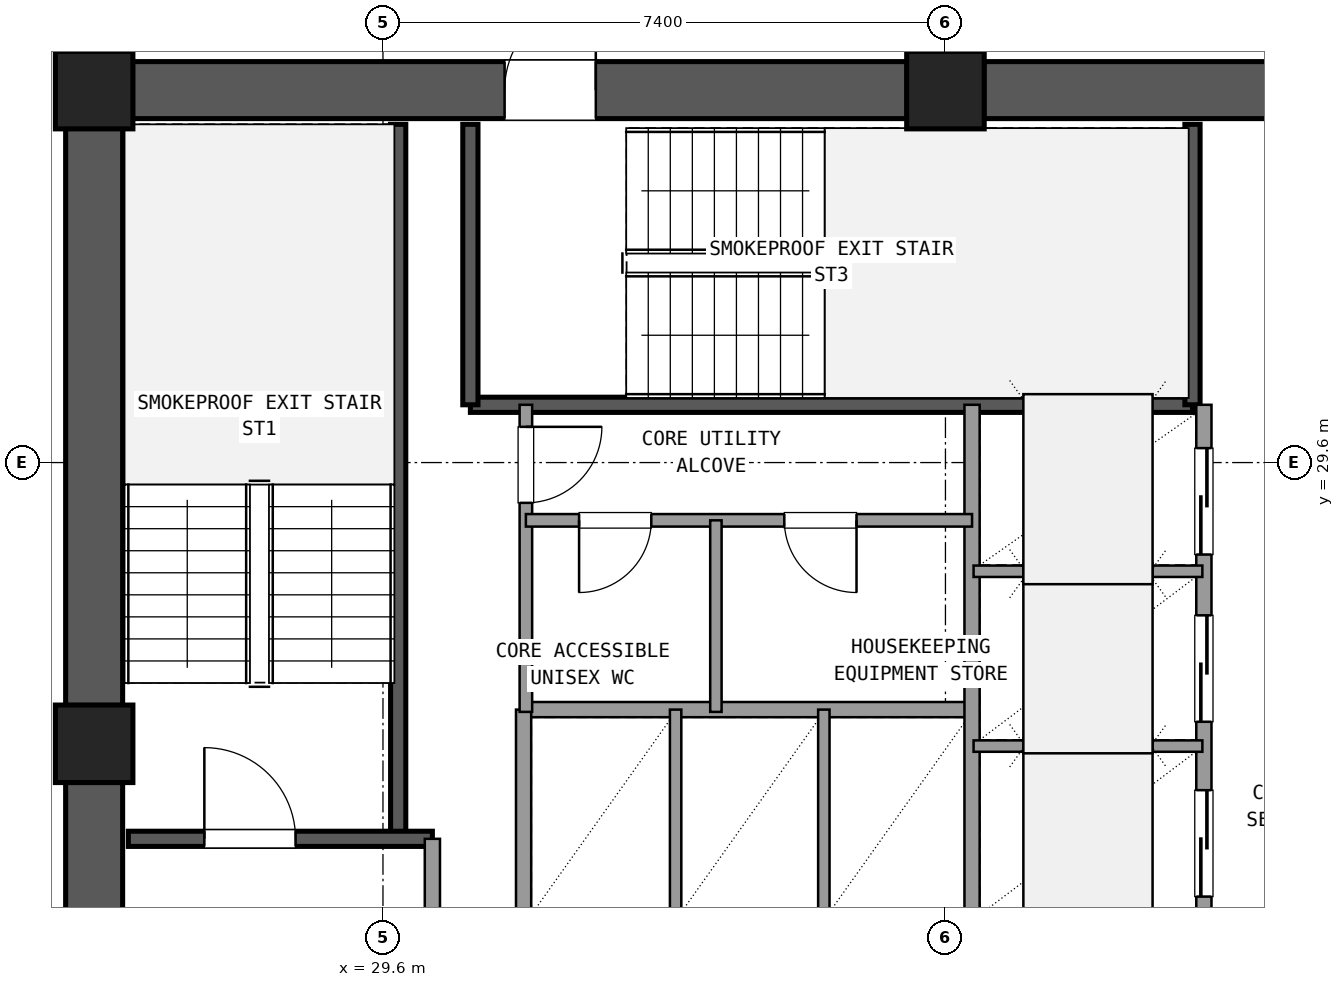
"""IFC4 building model, lengths in metres.
Left out: names, types, materials, properties, quantities, classifications, styles, units other than length and angle.
Written with IfcOpenShell. Run it as: python <this file> out.ifc"""

import sys

from ifc_helpers import new_model, si_unit, direction, frame, frame_2d, origin, origin_2d, place, context, subcontext, project, spatial, rectangle, extrude, element, fill, save


model = new_model("IFC4")
c1 = context("Model", 3, precision=1e-05, world=origin(), true_north=direction((0.0, 1.0)))
c2 = subcontext(c1, "Body", "Model", "MODEL_VIEW")
j1 = project(units=[si_unit("LENGTHUNIT", "METRE"), si_unit("PLANEANGLEUNIT", "RADIAN")], contexts=[c1])
p1 = place(None, origin())
s1 = spatial("IfcSite", under=j1, at=p1, CompositionType="ELEMENT")
p2 = place(p1, origin())
s2 = spatial("IfcBuilding", under=s1, at=p2, CompositionType="ELEMENT")
p3 = place(p2, frame((0.0, 0.0, 95.58)))
s3 = spatial("IfcBuildingStorey", under=s2, at=p3, CompositionType="ELEMENT", Elevation=95.58)
for number, where, z_axis, x_axis in (
    (1, (37.0, 34.5, 0.0), (0.0, 0.0, 1.0), (1.0, 0.0, 0.0)),
    (2, (25.8, 34.5, 0.0), (0.0, 0.0, 1.0), (1.0, 0.0, 0.0)),
    (3, (25.8, 25.9, 0.0), (0.0, 0.0, 1.0), (1.0, 0.0, 0.0)),
):
    element("IfcColumn", number, at=place(p3, frame(where, z_axis=z_axis, x_axis=x_axis)), inside=s3, PredefinedType="COLUMN", context=c2, shape_type="SweptSolid", body=[
        extrude(rectangle(XDim=1.02, YDim=1.02, at=origin_2d()), origin(), (0.0, 0.0, 1.0), 3.6),
    ])
p4 = place(p3, frame((47.695, 34.5, 0.0), z_axis=(0.0, 0.0, 1.0), x_axis=(-1.0, 0.0, 0.0)))
e4 = element("IfcWall", 4, at=p4, inside=s3, PredefinedType="SHEAR", context=c2, shape_type="SweptSolid", body=[
    extrude(rectangle(XDim=10.19, YDim=0.75, at=frame_2d((5.095, 0.0))), origin(), (0.0, 0.0, 1.0), 3.32),
])
p5 = place(p4, frame((4.595, 0.0, 0.0)))
e5 = element("IfcOpeningElement", 5, at=p5, cuts=e4, PredefinedType="OPENING", context=c2, shape_type="SweptSolid", body=[
    extrude(rectangle(XDim=1.6, YDim=2.2, at=frame_2d((0.8, 1.1))), frame((0.0, 0.385, 0.0), z_axis=(0.0, -1.0, 0.0), x_axis=(1.0, 0.0, 0.0)), (0.0, 0.0, 1.0), 0.77),
])
p6 = place(p3, frame((36.495, 34.5, 0.0), z_axis=(0.0, 0.0, 1.0), x_axis=(-1.0, 0.0, 0.0)))
e6 = element("IfcWall", 6, at=p6, inside=s3, PredefinedType="SHEAR", context=c2, shape_type="SweptSolid", body=[
    extrude(rectangle(XDim=10.19, YDim=0.75, at=frame_2d((5.095, 0.0))), origin(), (0.0, 0.0, 1.0), 3.32),
])
p7 = place(p6, frame((4.095, 0.0, 0.0)))
e7 = element("IfcOpeningElement", 7, at=p7, cuts=e6, PredefinedType="OPENING", context=c2, shape_type="SweptSolid", body=[
    extrude(rectangle(XDim=1.2, YDim=2.15, at=frame_2d((0.6, 1.075))), frame((0.0, 0.385, 0.0), z_axis=(0.0, -1.0, 0.0), x_axis=(1.0, 0.0, 0.0)), (0.0, 0.0, 1.0), 0.77),
])
p8 = place(p3, frame((25.8, 33.995, 0.0), z_axis=(0.0, 0.0, 1.0), x_axis=(0.0, -1.0, 0.0)))
e8 = element("IfcWall", 8, at=p8, inside=s3, PredefinedType="SHEAR", context=c2, shape_type="SweptSolid", body=[
    extrude(rectangle(XDim=7.59, YDim=0.75, at=frame_2d((3.795, 0.0))), origin(), (0.0, 0.0, 1.0), 3.32),
])
p9 = place(p3, frame((25.8, 25.395, 0.0), z_axis=(0.0, 0.0, 1.0), x_axis=(0.0, -1.0, 0.0)))
e9 = element("IfcWall", 9, at=p9, inside=s3, PredefinedType="SHEAR", context=c2, shape_type="SweptSolid", body=[
    extrude(rectangle(XDim=7.59, YDim=0.75, at=frame_2d((3.795, 0.0))), origin(), (0.0, 0.0, 1.0), 3.32),
])
p10 = place(p9, frame((2.145, 0.0, 0.0)))
e10 = element("IfcOpeningElement", 10, at=p10, cuts=e9, PredefinedType="OPENING", context=c2, shape_type="SweptSolid", body=[
    extrude(rectangle(XDim=1.2, YDim=2.15, at=frame_2d((0.6, 1.075))), frame((0.0, 0.385, 0.0), z_axis=(0.0, -1.0, 0.0), x_axis=(1.0, 0.0, 0.0)), (0.0, 0.0, 1.0), 0.77),
])
p11 = place(p3, frame((29.8, 24.65, 0.0), z_axis=(0.0, 0.0, 1.0), x_axis=(0.0, 1.0, 0.0)))
e11 = element("IfcWall", 11, at=p11, inside=s3, PredefinedType="SHEAR", context=c2, shape_type="SweptSolid", body=[
    extrude(rectangle(XDim=9.4, YDim=0.2, at=frame_2d((4.7, 0.0))), origin(), (0.0, 0.0, 1.0), 3.32),
])
p12 = place(p3, frame((26.25, 24.65, 0.0), z_axis=(0.0, 0.0, 1.0), x_axis=(1.0, 0.0, 0.0)))
e12 = element("IfcWall", 12, at=p12, inside=s3, PredefinedType="SHEAR", context=c2, shape_type="SweptSolid", body=[
    extrude(rectangle(XDim=4.0, YDim=0.2, at=frame_2d((2.0, 0.0))), origin(), (0.0, 0.0, 1.0), 3.32),
])
p13 = place(p12, frame((1.0, 0.0, 0.0)))
e13 = element("IfcOpeningElement", 13, at=p13, cuts=e12, PredefinedType="OPENING", context=c2, shape_type="SweptSolid", body=[
    extrude(rectangle(XDim=1.2, YDim=2.15, at=frame_2d((0.6, 1.075))), frame((0.0, 0.11, 0.0), z_axis=(0.0, -1.0, 0.0), x_axis=(1.0, 0.0, 0.0)), (0.0, 0.0, 1.0), 0.22),
])
p14 = place(p3, frame((30.75, 30.36, 0.0), z_axis=(0.0, 0.0, 1.0), x_axis=(1.0, 0.0, 0.0)))
e14 = element("IfcWall", 14, at=p14, inside=s3, PredefinedType="SHEAR", context=c2, shape_type="SweptSolid", body=[
    extrude(rectangle(XDim=9.5, YDim=0.2, at=frame_2d((4.75, 0.0))), origin(), (0.0, 0.0, 1.0), 3.32),
])
for number, where, z_axis, x_axis in (
    (15, (30.75, 30.36, 0.0), (0.0, 0.0, 1.0), (0.0, 1.0, 0.0)),
    (16, (40.25, 30.36, 0.0), (0.0, 0.0, 1.0), (0.0, 1.0, 0.0)),
):
    element("IfcWall", number, at=place(p3, frame(where, z_axis=z_axis, x_axis=x_axis)), inside=s3, PredefinedType="SHEAR", context=c2, shape_type="SweptSolid", body=[
        extrude(rectangle(XDim=3.69, YDim=0.2, at=frame_2d((1.845, 0.0))), origin(), (0.0, 0.0, 1.0), 3.32),
    ])
p15 = place(p3, frame((30.25, 17.75, 0.0), z_axis=(0.0, 0.0, 1.0), x_axis=(0.0, 1.0, 0.0)))
e17 = element("IfcWall", 17, at=p15, inside=s3, PredefinedType="SOLIDWALL", context=c2, shape_type="SweptSolid", body=[
    extrude(rectangle(XDim=6.9, YDim=0.2, at=frame_2d((3.45, 0.0))), origin(), (0.0, 0.0, 1.0), 2.61),
])
p16 = place(p15, frame((4.15, 0.0, 0.0)))
e18 = element("IfcOpeningElement", 18, at=p16, cuts=e17, PredefinedType="OPENING", context=c2, shape_type="SweptSolid", body=[
    extrude(rectangle(XDim=1.2, YDim=2.15, at=frame_2d((0.6, 1.075))), frame((0.0, 0.11, 0.0), z_axis=(0.0, -1.0, 0.0), x_axis=(1.0, 0.0, 0.0)), (0.0, 0.0, 1.0), 0.22),
])
p17 = place(p3, frame((31.45, 26.35, 0.0), z_axis=(0.0, 0.0, 1.0), x_axis=(1.0, 0.0, 0.0)))
e19 = element("IfcWall", 19, at=p17, inside=s3, PredefinedType="SOLIDWALL", context=c2, shape_type="SweptSolid", body=[
    extrude(rectangle(XDim=5.9, YDim=0.2, at=frame_2d((2.95, 0.0))), origin(), (0.0, 0.0, 1.0), 2.61),
])
p18 = place(p3, frame((31.45, 23.54, 0.0), z_axis=(0.0, 0.0, 1.0), x_axis=(0.0, 1.0, 0.0)))
e20 = element("IfcWall", 20, at=p18, inside=s3, PredefinedType="SOLIDWALL", context=c2, shape_type="SweptSolid", body=[
    extrude(rectangle(XDim=2.81, YDim=0.2, at=frame_2d((1.405, 0.0))), origin(), (0.0, 0.0, 1.0), 2.61),
])
for number, where, z_axis, x_axis in (
    (21, (33.45, 23.54, 0.0), (0.0, 0.0, 1.0), (0.0, 1.0, 0.0)),
    (22, (35.4, 23.54, 0.0), (0.0, 0.0, 1.0), (0.0, 1.0, 0.0)),
):
    element("IfcWall", number, at=place(p3, frame(where, z_axis=z_axis, x_axis=x_axis)), inside=s3, PredefinedType="PARTITIONING", context=c2, shape_type="SweptSolid", body=[
        extrude(rectangle(XDim=2.81, YDim=0.15, at=frame_2d((1.405, 0.0))), origin(), (0.0, 0.0, 1.0), 2.61),
    ])
p19 = place(p3, frame((37.35, 23.54, 0.0), z_axis=(0.0, 0.0, 1.0), x_axis=(0.0, 1.0, 0.0)))
e23 = element("IfcWall", 23, at=p19, inside=s3, PredefinedType="SOLIDWALL", context=c2, shape_type="SweptSolid", body=[
    extrude(rectangle(XDim=6.82, YDim=0.2, at=frame_2d((3.41, 0.0))), origin(), (0.0, 0.0, 1.0), 2.61),
])
p20 = place(p3, frame((40.4, 23.54, 0.0), z_axis=(0.0, 0.0, 1.0), x_axis=(0.0, 1.0, 0.0)))
e24 = element("IfcWall", 24, at=p20, inside=s3, PredefinedType="SOLIDWALL", context=c2, shape_type="SweptSolid", body=[
    extrude(rectangle(XDim=6.82, YDim=0.2, at=frame_2d((3.41, 0.0))), origin(), (0.0, 0.0, 1.0), 2.61),
])
p21 = place(p20, frame((0.35, 0.0, 0.0)))
e25 = element("IfcOpeningElement", 25, at=p21, cuts=e24, PredefinedType="OPENING", context=c2, shape_type="SweptSolid", body=[
    extrude(rectangle(XDim=1.4, YDim=2.2, at=frame_2d((0.7, 1.1))), frame((0.0, 0.11, 0.0), z_axis=(0.0, -1.0, 0.0), x_axis=(1.0, 0.0, 0.0)), (0.0, 0.0, 1.0), 0.22),
])
p22 = place(p20, frame((2.65, 0.0, 0.0)))
e26 = element("IfcOpeningElement", 26, at=p22, cuts=e24, PredefinedType="OPENING", context=c2, shape_type="SweptSolid", body=[
    extrude(rectangle(XDim=1.4, YDim=2.2, at=frame_2d((0.7, 1.1))), frame((0.0, 0.11, 0.0), z_axis=(0.0, -1.0, 0.0), x_axis=(1.0, 0.0, 0.0)), (0.0, 0.0, 1.0), 0.22),
])
p23 = place(p20, frame((4.85, 0.0, 0.0)))
e27 = element("IfcOpeningElement", 27, at=p23, cuts=e24, PredefinedType="OPENING", context=c2, shape_type="SweptSolid", body=[
    extrude(rectangle(XDim=1.4, YDim=2.2, at=frame_2d((0.7, 1.1))), frame((0.0, 0.11, 0.0), z_axis=(0.0, -1.0, 0.0), x_axis=(1.0, 0.0, 0.0)), (0.0, 0.0, 1.0), 0.22),
])
for number, where, z_axis, x_axis in (
    (28, (37.37, 25.87, 0.0), (0.0, 0.0, 1.0), (1.0, 0.0, 0.0)),
    (29, (37.37, 28.17, 0.0), (0.0, 0.0, 1.0), (1.0, 0.0, 0.0)),
):
    element("IfcWall", number, at=place(p3, frame(where, z_axis=z_axis, x_axis=x_axis)), inside=s3, PredefinedType="PARTITIONING", context=c2, shape_type="SweptSolid", body=[
        extrude(rectangle(XDim=3.01, YDim=0.15, at=frame_2d((1.505, 0.0))), origin(), (0.0, 0.0, 1.0), 2.61),
    ])
p24 = place(p3, frame((31.48, 26.32, 0.0), z_axis=(0.0, 0.0, 1.0), x_axis=(0.0, 1.0, 0.0)))
e30 = element("IfcWall", 30, at=p24, inside=s3, PredefinedType="PLUMBINGWALL", context=c2, shape_type="SweptSolid", body=[
    extrude(rectangle(XDim=4.04, YDim=0.165, at=frame_2d((2.02, 0.0))), origin(), (0.0, 0.0, 1.0), 2.61),
])
p25 = place(p24, frame((2.75, 0.0, 0.0)))
e31 = element("IfcOpeningElement", 31, at=p25, cuts=e30, PredefinedType="OPENING", context=c2, shape_type="SweptSolid", body=[
    extrude(rectangle(XDim=1.0, YDim=2.15, at=frame_2d((0.5, 1.075))), frame((0.0, 0.093, 0.0), z_axis=(0.0, -1.0, 0.0), x_axis=(1.0, 0.0, 0.0)), (0.0, 0.0, 1.0), 0.185),
])
p26 = place(p3, frame((31.48, 28.84, 0.0), z_axis=(0.0, 0.0, 1.0), x_axis=(1.0, 0.0, 0.0)))
e32 = element("IfcWall", 32, at=p26, inside=s3, PredefinedType="PLUMBINGWALL", context=c2, shape_type="SweptSolid", body=[
    extrude(rectangle(XDim=5.87, YDim=0.165, at=frame_2d((2.935, 0.0))), origin(), (0.0, 0.0, 1.0), 2.61),
])
p27 = place(p26, frame((0.7, 0.0, 0.0)))
e33 = element("IfcOpeningElement", 33, at=p27, cuts=e32, PredefinedType="OPENING", context=c2, shape_type="SweptSolid", body=[
    extrude(rectangle(XDim=0.95, YDim=2.1, at=frame_2d((0.475, 1.05))), frame((0.0, 0.093, 0.0), z_axis=(0.0, -1.0, 0.0), x_axis=(1.0, 0.0, 0.0)), (0.0, 0.0, 1.0), 0.185),
])
p28 = place(p26, frame((3.4, 0.0, 0.0)))
e34 = element("IfcOpeningElement", 34, at=p28, cuts=e32, PredefinedType="OPENING", context=c2, shape_type="SweptSolid", body=[
    extrude(rectangle(XDim=0.95, YDim=2.1, at=frame_2d((0.475, 1.05))), frame((0.0, 0.093, 0.0), z_axis=(0.0, -1.0, 0.0), x_axis=(1.0, 0.0, 0.0)), (0.0, 0.0, 1.0), 0.185),
])
p29 = place(p3, frame((33.98, 26.32, 0.0), z_axis=(0.0, 0.0, 1.0), x_axis=(0.0, 1.0, 0.0)))
e35 = element("IfcWall", 35, at=p29, inside=s3, PredefinedType="PARTITIONING", context=c2, shape_type="SweptSolid", body=[
    extrude(rectangle(XDim=2.52, YDim=0.15, at=frame_2d((1.26, 0.0))), origin(), (0.0, 0.0, 1.0), 2.61),
])
p30 = place(p3, frame((37.0, 34.95, 0.0), z_axis=(0.0, 0.0, 1.0), x_axis=(0.0, 1.0, 0.0)))
e36 = element("IfcWall", 36, at=p30, inside=s3, PredefinedType="PARTITIONING", context=c2, shape_type="SweptSolid", body=[
    extrude(rectangle(XDim=3.21, YDim=0.18, at=frame_2d((1.605, 0.0))), origin(), (0.0, 0.0, 1.0), 2.61),
])
p31 = place(p30, frame((0.605, 0.0, 0.0)))
e37 = element("IfcOpeningElement", 37, at=p31, cuts=e36, PredefinedType="OPENING", context=c2, shape_type="SweptSolid", body=[
    extrude(rectangle(XDim=2.0, YDim=2.2, at=frame_2d((1.0, 1.1))), frame((0.0, 0.1, 0.0), z_axis=(0.0, -1.0, 0.0), x_axis=(1.0, 0.0, 0.0)), (0.0, 0.0, 1.0), 0.2),
])
p32 = place(p13, origin())
e38 = element("IfcDoor", 38, at=p32, inside=s3, OperationType="SINGLE_SWING_LEFT", PredefinedType="DOOR", context=c2, shape_type="SweptSolid", body=[
    extrude(rectangle(XDim=1.2, YDim=2.15, at=frame_2d((0.6, 1.075))), frame((0.0, 0.025, 0.0), z_axis=(0.0, -1.0, 0.0), x_axis=(1.0, 0.0, 0.0)), (0.0, 0.0, 1.0), 0.05),
])
fill(e13, e38)
p33 = place(p7, frame((1.2, 0.0, 0.0), z_axis=(0.0, 0.0, 1.0), x_axis=(-1.0, 0.0, 0.0)))
e39 = element("IfcDoor", 39, at=p33, inside=s3, OperationType="SINGLE_SWING_LEFT", PredefinedType="DOOR", context=c2, shape_type="SweptSolid", body=[
    extrude(rectangle(XDim=1.2, YDim=2.15, at=frame_2d((0.6, 1.075))), frame((0.0, 0.025, 0.0), z_axis=(0.0, -1.0, 0.0), x_axis=(1.0, 0.0, 0.0)), (0.0, 0.0, 1.0), 0.05),
])
fill(e7, e39)
p34 = place(p21, origin())
e40 = element("IfcDoor", 40, at=p34, inside=s3, OperationType="SLIDING_TO_LEFT", PredefinedType="DOOR", context=c2, shape_type="SweptSolid", body=[
    extrude(rectangle(XDim=1.4, YDim=2.2, at=frame_2d((0.7, 1.1))), frame((0.0, 0.025, 0.0), z_axis=(0.0, -1.0, 0.0), x_axis=(1.0, 0.0, 0.0)), (0.0, 0.0, 1.0), 0.05),
])
fill(e25, e40)
p35 = place(p22, origin())
e41 = element("IfcDoor", 41, at=p35, inside=s3, OperationType="SLIDING_TO_LEFT", PredefinedType="DOOR", context=c2, shape_type="SweptSolid", body=[
    extrude(rectangle(XDim=1.4, YDim=2.2, at=frame_2d((0.7, 1.1))), frame((0.0, 0.025, 0.0), z_axis=(0.0, -1.0, 0.0), x_axis=(1.0, 0.0, 0.0)), (0.0, 0.0, 1.0), 0.05),
])
fill(e26, e41)
p36 = place(p23, origin())
e42 = element("IfcDoor", 42, at=p36, inside=s3, OperationType="SLIDING_TO_RIGHT", PredefinedType="DOOR", context=c2, shape_type="SweptSolid", body=[
    extrude(rectangle(XDim=1.4, YDim=2.2, at=frame_2d((0.7, 1.1))), frame((0.0, 0.025, 0.0), z_axis=(0.0, -1.0, 0.0), x_axis=(1.0, 0.0, 0.0)), (0.0, 0.0, 1.0), 0.05),
])
fill(e27, e42)
p37 = place(p25, frame((1.0, 0.0, 0.0), z_axis=(0.0, 0.0, 1.0), x_axis=(-1.0, 0.0, 0.0)))
e43 = element("IfcDoor", 43, at=p37, inside=s3, OperationType="SINGLE_SWING_RIGHT", PredefinedType="DOOR", context=c2, shape_type="SweptSolid", body=[
    extrude(rectangle(XDim=1.0, YDim=2.15, at=frame_2d((0.5, 1.075))), frame((0.0, 0.025, 0.0), z_axis=(0.0, -1.0, 0.0), x_axis=(1.0, 0.0, 0.0)), (0.0, 0.0, 1.0), 0.05),
])
fill(e31, e43)
p38 = place(p27, frame((0.95, 0.0, 0.0), z_axis=(0.0, 0.0, 1.0), x_axis=(-1.0, 0.0, 0.0)))
e44 = element("IfcDoor", 44, at=p38, inside=s3, OperationType="SINGLE_SWING_LEFT", PredefinedType="DOOR", context=c2, shape_type="SweptSolid", body=[
    extrude(rectangle(XDim=0.95, YDim=2.1, at=frame_2d((0.475, 1.05))), frame((0.0, 0.025, 0.0), z_axis=(0.0, -1.0, 0.0), x_axis=(1.0, 0.0, 0.0)), (0.0, 0.0, 1.0), 0.05),
])
fill(e33, e44)
p39 = place(p28, frame((0.95, 0.0, 0.0), z_axis=(0.0, 0.0, 1.0), x_axis=(-1.0, 0.0, 0.0)))
e45 = element("IfcDoor", 45, at=p39, inside=s3, OperationType="SINGLE_SWING_RIGHT", PredefinedType="DOOR", context=c2, shape_type="SweptSolid", body=[
    extrude(rectangle(XDim=0.95, YDim=2.1, at=frame_2d((0.475, 1.05))), frame((0.0, 0.025, 0.0), z_axis=(0.0, -1.0, 0.0), x_axis=(1.0, 0.0, 0.0)), (0.0, 0.0, 1.0), 0.05),
])
fill(e34, e45)
save(model, sys.argv[1])
